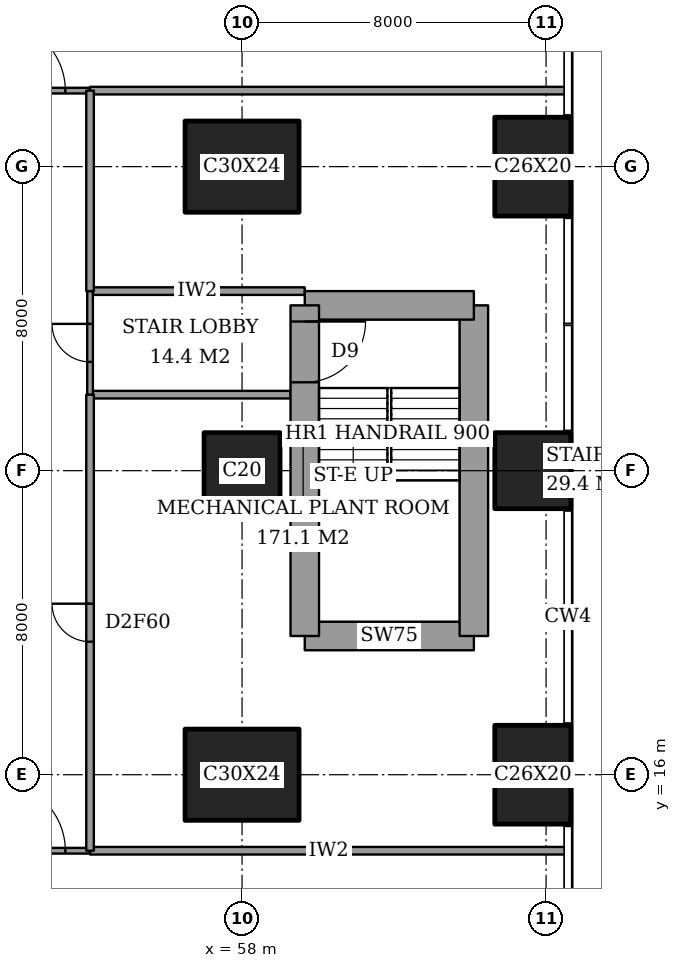
"""IFC4 building model, lengths in metres.
Left out: names, types, materials, properties, quantities, classifications, styles, units other than length and angle.
Written with IfcOpenShell. Run it as: python <this file> out.ifc"""

import sys

from ifc_helpers import new_model, si_unit, direction, frame, frame_2d, origin, origin_2d, place, context, subcontext, project, spatial, rectangle, extrude, element, fill, save


model = new_model("IFC4")
c1 = context("Model", 3, precision=1e-05, world=origin(), true_north=direction((0.0, 1.0)))
c2 = subcontext(c1, "Body", "Model", "MODEL_VIEW")
j1 = project(units=[si_unit("LENGTHUNIT", "METRE"), si_unit("PLANEANGLEUNIT", "RADIAN")], contexts=[c1])
p1 = place(None, origin())
s1 = spatial("IfcSite", under=j1, at=p1, CompositionType="ELEMENT")
p2 = place(p1, origin())
s2 = spatial("IfcBuilding", under=s1, at=p2, CompositionType="ELEMENT")
p3 = place(p2, frame((0.0, 0.0, 26.0)))
s3 = spatial("IfcBuildingStorey", under=s2, at=p3, CompositionType="ELEMENT", Elevation=26.0)
p4 = place(p3, frame((58.0, 16.0, 0.0), z_axis=(0.0, 0.0, 1.0), x_axis=(1.0, 0.0, 0.0)))
e1 = element("IfcColumn", 1, at=p4, inside=s3, PredefinedType="COLUMN", context=c2, shape_type="SweptSolid", body=[
    extrude(rectangle(XDim=3.0, YDim=2.4, at=origin_2d()), origin(), (0.0, 0.0, 1.0), 3.6),
])
p5 = place(p3, frame((58.0, 24.0, 0.0), z_axis=(0.0, 0.0, 1.0), x_axis=(1.0, 0.0, 0.0)))
e2 = element("IfcColumn", 2, at=p5, inside=s3, PredefinedType="COLUMN", context=c2, shape_type="SweptSolid", body=[
    extrude(rectangle(XDim=2.0, YDim=2.0, at=origin_2d()), origin(), (0.0, 0.0, 1.0), 3.6),
])
p6 = place(p3, frame((58.0, 32.0, 0.0), z_axis=(0.0, 0.0, 1.0), x_axis=(1.0, 0.0, 0.0)))
e3 = element("IfcColumn", 3, at=p6, inside=s3, PredefinedType="COLUMN", context=c2, shape_type="SweptSolid", body=[
    extrude(rectangle(XDim=3.0, YDim=2.4, at=origin_2d()), origin(), (0.0, 0.0, 1.0), 3.6),
])
p7 = place(p3, frame((65.65, 16.0, 0.0), z_axis=(0.0, 0.0, 1.0), x_axis=(0.0, 1.0, 0.0)))
e4 = element("IfcColumn", 4, at=p7, inside=s3, PredefinedType="COLUMN", context=c2, shape_type="SweptSolid", body=[
    extrude(rectangle(XDim=2.6, YDim=2.0, at=origin_2d()), origin(), (0.0, 0.0, 1.0), 3.6),
])
p8 = place(p3, frame((65.65, 24.0, 0.0), z_axis=(0.0, 0.0, 1.0), x_axis=(1.0, 0.0, 0.0)))
e5 = element("IfcColumn", 5, at=p8, inside=s3, PredefinedType="COLUMN", context=c2, shape_type="SweptSolid", body=[
    extrude(rectangle(XDim=2.0, YDim=2.0, at=origin_2d()), origin(), (0.0, 0.0, 1.0), 3.6),
])
p9 = place(p3, frame((65.65, 32.0, 0.0), z_axis=(0.0, 0.0, 1.0), x_axis=(0.0, 1.0, 0.0)))
e6 = element("IfcColumn", 6, at=p9, inside=s3, PredefinedType="COLUMN", context=c2, shape_type="SweptSolid", body=[
    extrude(rectangle(XDim=2.6, YDim=2.0, at=origin_2d()), origin(), (0.0, 0.0, 1.0), 3.6),
])
p10 = place(p3, frame((59.65, 19.65, 0.0), z_axis=(0.0, 0.0, 1.0), x_axis=(1.0, 0.0, 0.0)))
e7 = element("IfcWall", 7, at=p10, inside=s3, PredefinedType="SHEAR", context=c2, shape_type="SweptSolid", body=[
    extrude(rectangle(XDim=4.45, YDim=0.75, at=frame_2d((2.225, 0.0))), origin(), (0.0, 0.0, 1.0), 3.6),
])
p11 = place(p3, frame((64.1, 19.65, 0.0), z_axis=(0.0, 0.0, 1.0), x_axis=(0.0, 1.0, 0.0)))
e8 = element("IfcWall", 8, at=p11, inside=s3, PredefinedType="SHEAR", context=c2, shape_type="SweptSolid", body=[
    extrude(rectangle(XDim=8.7, YDim=0.75, at=frame_2d((4.35, 0.0))), origin(), (0.0, 0.0, 1.0), 3.6),
])
p12 = place(p3, frame((64.1, 28.35, 0.0), z_axis=(0.0, 0.0, 1.0), x_axis=(-1.0, 0.0, 0.0)))
e9 = element("IfcWall", 9, at=p12, inside=s3, PredefinedType="SHEAR", context=c2, shape_type="SweptSolid", body=[
    extrude(rectangle(XDim=4.45, YDim=0.75, at=frame_2d((2.225, 0.0))), origin(), (0.0, 0.0, 1.0), 3.6),
])
p13 = place(p3, frame((59.65, 28.35, 0.0), z_axis=(0.0, 0.0, 1.0), x_axis=(0.0, -1.0, 0.0)))
e10 = element("IfcWall", 10, at=p13, inside=s3, PredefinedType="SHEAR", context=c2, shape_type="SweptSolid", body=[
    extrude(rectangle(XDim=8.7, YDim=0.75, at=frame_2d((4.35, 0.0))), origin(), (0.0, 0.0, 1.0), 3.6),
])
p14 = place(p13, frame((0.425, 0.0, 0.0)))
e11 = element("IfcOpeningElement", 11, at=p14, cuts=e10, PredefinedType="OPENING", context=c2, shape_type="SweptSolid", body=[
    extrude(rectangle(XDim=1.6, YDim=2.1, at=frame_2d((0.8, 1.05))), frame((0.0, 0.385, 0.0), z_axis=(0.0, -1.0, 0.0), x_axis=(1.0, 0.0, 0.0)), (0.0, 0.0, 1.0), 0.77),
])
p15 = place(p3, frame((54.0, 14.0, 0.0), z_axis=(0.0, 0.0, 1.0), x_axis=(1.0, 0.0, 0.0)))
e12 = element("IfcWall", 12, at=p15, inside=s3, PredefinedType="PARTITIONING", context=c2, shape_type="SweptSolid", body=[
    extrude(rectangle(XDim=12.561, YDim=0.2, at=frame_2d((6.281, 0.0))), origin(), (0.0, 0.0, 1.0), 3.35),
])
p16 = place(p3, frame((47.1, 14.0, 0.0), z_axis=(0.0, 0.0, 1.0), x_axis=(1.0, 0.0, 0.0)))
e13 = element("IfcWall", 13, at=p16, inside=s3, PredefinedType="PARTITIONING", context=c2, shape_type="SweptSolid", body=[
    extrude(rectangle(XDim=6.9, YDim=0.15, at=frame_2d((3.45, 0.0))), origin(), (0.0, 0.0, 1.0), 3.35),
])
p17 = place(p16, frame((4.45, 0.0, 0.0)))
e14 = element("IfcOpeningElement", 14, at=p17, cuts=e13, PredefinedType="OPENING", context=c2, shape_type="SweptSolid", body=[
    extrude(rectangle(XDim=1.8, YDim=2.1, at=frame_2d((0.9, 1.05))), frame((0.0, 0.085, 0.0), z_axis=(0.0, -1.0, 0.0), x_axis=(1.0, 0.0, 0.0)), (0.0, 0.0, 1.0), 0.17),
])
p18 = place(p3, frame((54.0, 26.0, 0.0), z_axis=(0.0, 0.0, 1.0), x_axis=(1.0, 0.0, 0.0)))
e15 = element("IfcWall", 15, at=p18, inside=s3, PredefinedType="PARTITIONING", context=c2, shape_type="SweptSolid", body=[
    extrude(rectangle(XDim=5.275, YDim=0.2, at=frame_2d((2.637, 0.0))), origin(), (0.0, 0.0, 1.0), 3.35),
])
p19 = place(p3, frame((54.0, 28.725, 0.0), z_axis=(0.0, 0.0, 1.0), x_axis=(1.0, 0.0, 0.0)))
e16 = element("IfcWall", 16, at=p19, inside=s3, PredefinedType="PARTITIONING", context=c2, shape_type="SweptSolid", body=[
    extrude(rectangle(XDim=5.65, YDim=0.2, at=frame_2d((2.825, 0.0))), origin(), (0.0, 0.0, 1.0), 3.35),
])
p20 = place(p3, frame((54.0, 34.0, 0.0), z_axis=(0.0, 0.0, 1.0), x_axis=(1.0, 0.0, 0.0)))
e17 = element("IfcWall", 17, at=p20, inside=s3, PredefinedType="PARTITIONING", context=c2, shape_type="SweptSolid", body=[
    extrude(rectangle(XDim=12.561, YDim=0.2, at=frame_2d((6.281, 0.0))), origin(), (0.0, 0.0, 1.0), 3.35),
])
p21 = place(p3, frame((42.0, 34.0, 0.0), z_axis=(0.0, 0.0, 1.0), x_axis=(1.0, 0.0, 0.0)))
e18 = element("IfcWall", 18, at=p21, inside=s3, PredefinedType="PARTITIONING", context=c2, shape_type="SweptSolid", body=[
    extrude(rectangle(XDim=12.0, YDim=0.15, at=frame_2d((6.0, 0.0))), origin(), (0.0, 0.0, 1.0), 3.35),
])
p22 = place(p21, frame((9.55, 0.0, 0.0)))
e19 = element("IfcOpeningElement", 19, at=p22, cuts=e18, PredefinedType="OPENING", context=c2, shape_type="SweptSolid", body=[
    extrude(rectangle(XDim=1.8, YDim=2.1, at=frame_2d((0.9, 1.05))), frame((0.0, 0.085, 0.0), z_axis=(0.0, -1.0, 0.0), x_axis=(1.0, 0.0, 0.0)), (0.0, 0.0, 1.0), 0.17),
])
p23 = place(p3, frame((54.0, 14.0, 0.0), z_axis=(0.0, 0.0, 1.0), x_axis=(0.0, 1.0, 0.0)))
e20 = element("IfcWall", 20, at=p23, inside=s3, PredefinedType="PARTITIONING", context=c2, shape_type="SweptSolid", body=[
    extrude(rectangle(XDim=12.0, YDim=0.2, at=frame_2d((6.0, 0.0))), origin(), (0.0, 0.0, 1.0), 3.35),
])
p24 = place(p23, frame((5.5, 0.0, 0.0)))
e21 = element("IfcOpeningElement", 21, at=p24, cuts=e20, PredefinedType="OPENING", context=c2, shape_type="SweptSolid", body=[
    extrude(rectangle(XDim=1.0, YDim=2.1, at=frame_2d((0.5, 1.05))), frame((0.0, 0.11, 0.0), z_axis=(0.0, -1.0, 0.0), x_axis=(1.0, 0.0, 0.0)), (0.0, 0.0, 1.0), 0.22),
])
p25 = place(p3, frame((54.0, 28.725, 0.0), z_axis=(0.0, 0.0, 1.0), x_axis=(0.0, 1.0, 0.0)))
e22 = element("IfcWall", 22, at=p25, inside=s3, PredefinedType="PARTITIONING", context=c2, shape_type="SweptSolid", body=[
    extrude(rectangle(XDim=5.275, YDim=0.2, at=frame_2d((2.637, 0.0))), origin(), (0.0, 0.0, 1.0), 3.35),
])
p26 = place(p3, frame((54.0, 26.0, 0.0), z_axis=(0.0, 0.0, 1.0), x_axis=(0.0, 1.0, 0.0)))
e23 = element("IfcWall", 23, at=p26, inside=s3, PredefinedType="PARTITIONING", context=c2, shape_type="SweptSolid", body=[
    extrude(rectangle(XDim=2.725, YDim=0.15, at=frame_2d((1.363, 0.0))), origin(), (0.0, 0.0, 1.0), 3.35),
])
p27 = place(p26, frame((0.863, 0.0, 0.0)))
e24 = element("IfcOpeningElement", 24, at=p27, cuts=e23, PredefinedType="OPENING", context=c2, shape_type="SweptSolid", body=[
    extrude(rectangle(XDim=1.0, YDim=2.1, at=frame_2d((0.5, 1.05))), frame((0.0, 0.085, 0.0), z_axis=(0.0, -1.0, 0.0), x_axis=(1.0, 0.0, 0.0)), (0.0, 0.0, 1.0), 0.17),
])
p28 = place(p17, origin())
e25 = element("IfcDoor", 25, at=p28, inside=s3, OperationType="DOUBLE_DOOR_DOUBLE_SWING", PredefinedType="DOOR", context=c2, shape_type="SweptSolid", body=[
    extrude(rectangle(XDim=1.8, YDim=2.1, at=frame_2d((0.9, 1.05))), frame((0.0, 0.025, 0.0), z_axis=(0.0, -1.0, 0.0), x_axis=(1.0, 0.0, 0.0)), (0.0, 0.0, 1.0), 0.05),
])
fill(e14, e25)
p29 = place(p24, origin())
e26 = element("IfcDoor", 26, at=p29, inside=s3, OperationType="SINGLE_SWING_LEFT", PredefinedType="DOOR", context=c2, shape_type="SweptSolid", body=[
    extrude(rectangle(XDim=1.0, YDim=2.1, at=frame_2d((0.5, 1.05))), frame((0.0, 0.025, 0.0), z_axis=(0.0, -1.0, 0.0), x_axis=(1.0, 0.0, 0.0)), (0.0, 0.0, 1.0), 0.05),
])
fill(e21, e26)
p30 = place(p22, origin())
e27 = element("IfcDoor", 27, at=p30, inside=s3, OperationType="DOUBLE_DOOR_DOUBLE_SWING", PredefinedType="DOOR", context=c2, shape_type="SweptSolid", body=[
    extrude(rectangle(XDim=1.8, YDim=2.1, at=frame_2d((0.9, 1.05))), frame((0.0, 0.025, 0.0), z_axis=(0.0, -1.0, 0.0), x_axis=(1.0, 0.0, 0.0)), (0.0, 0.0, 1.0), 0.05),
])
fill(e19, e27)
p31 = place(p27, origin())
e28 = element("IfcDoor", 28, at=p31, inside=s3, OperationType="SINGLE_SWING_LEFT", PredefinedType="DOOR", context=c2, shape_type="SweptSolid", body=[
    extrude(rectangle(XDim=1.0, YDim=2.1, at=frame_2d((0.5, 1.05))), frame((0.0, 0.025, 0.0), z_axis=(0.0, -1.0, 0.0), x_axis=(1.0, 0.0, 0.0)), (0.0, 0.0, 1.0), 0.05),
])
fill(e24, e28)
p32 = place(p14, origin())
e29 = element("IfcDoor", 29, at=p32, inside=s3, OperationType="DOUBLE_DOOR_SINGLE_SWING", PredefinedType="DOOR", context=c2, shape_type="SweptSolid", body=[
    extrude(rectangle(XDim=1.6, YDim=2.1, at=frame_2d((0.8, 1.05))), frame((0.0, 0.025, 0.0), z_axis=(0.0, -1.0, 0.0), x_axis=(1.0, 0.0, 0.0)), (0.0, 0.0, 1.0), 0.05),
])
fill(e11, e29)
save(model, sys.argv[1])
